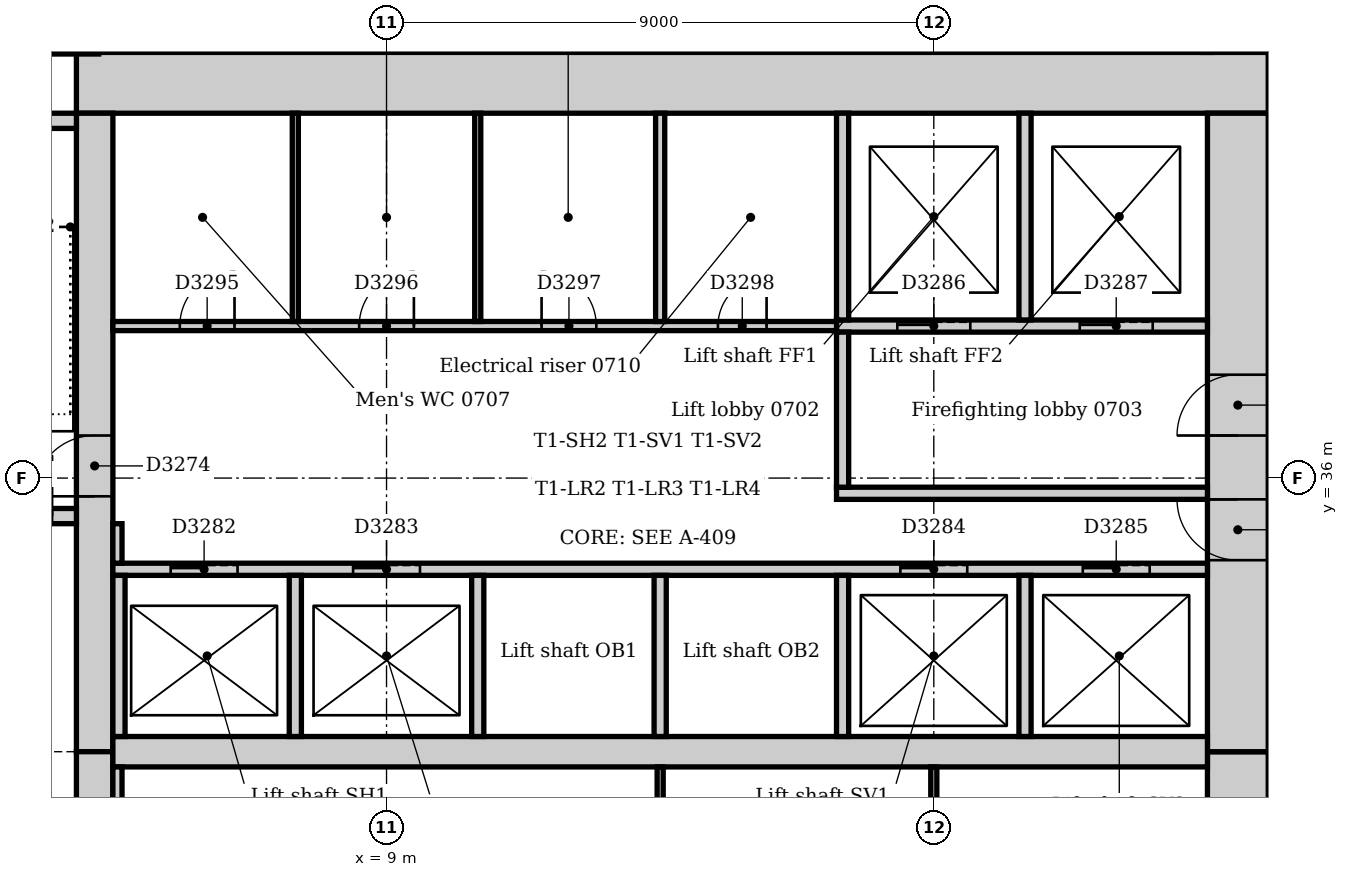
"""IFC4 building model, lengths in metres.
Left out: names, types, materials, properties, quantities, classifications, styles, units other than length and angle.
Written with IfcOpenShell. Run it as: python <this file> out.ifc"""

import sys

from ifc_helpers import new_model, si_unit, direction, frame, frame_2d, origin, origin_2d, place, context, subcontext, project, spatial, rectangle, extrude, element, fill, save


model = new_model("IFC4")
c1 = context("Model", 3, precision=1e-05, world=origin(), true_north=direction((0.0, 1.0)))
c2 = subcontext(c1, "Body", "Model", "MODEL_VIEW")
j1 = project(units=[si_unit("LENGTHUNIT", "METRE"), si_unit("PLANEANGLEUNIT", "RADIAN")], contexts=[c1])
p1 = place(None, origin())
s1 = spatial("IfcSite", under=j1, at=p1, CompositionType="ELEMENT")
p2 = place(p1, origin())
s2 = spatial("IfcBuilding", under=s1, at=p2, CompositionType="ELEMENT")
p3 = place(p2, frame((0.0, 0.0, 34.0)))
s3 = spatial("IfcBuildingStorey", under=s2, at=p3, CompositionType="ELEMENT", Elevation=34.0)
p4 = place(p3, frame((23.5, 42.5, 0.0), z_axis=(0.0, 0.0, 1.0), x_axis=(-1.0, 0.0, 0.0)))
e1 = element("IfcWall", 1, at=p4, inside=s3, PredefinedType="SOLIDWALL", context=c2, shape_type="SweptSolid", body=[
    extrude(rectangle(XDim=19.6, YDim=1.0, at=frame_2d((9.8, 0.0))), origin(), (0.0, 0.0, 1.0), 4.0),
])
p5 = place(p3, frame((23.0, 21.0, 0.0), z_axis=(0.0, 0.0, 1.0), x_axis=(0.0, 1.0, 0.0)))
e2 = element("IfcWall", 2, at=p5, inside=s3, PredefinedType="SOLIDWALL", context=c2, shape_type="SweptSolid", body=[
    extrude(rectangle(XDim=10.5, YDim=1.0, at=frame_2d((5.25, 0.0))), origin(), (0.0, 0.0, 1.0), 4.0),
])
p6 = place(p5, frame((4.35, 0.0, 0.0)))
e3 = element("IfcOpeningElement", 3, at=p6, cuts=e2, PredefinedType="OPENING", context=c2, shape_type="SweptSolid", body=[
    extrude(rectangle(XDim=1.8, YDim=2.1, at=frame_2d((0.9, 1.05))), frame((0.0, 0.51, 0.0), z_axis=(0.0, -1.0, 0.0), x_axis=(1.0, 0.0, 0.0)), (0.0, 0.0, 1.0), 1.02),
])
p7 = place(p3, frame((23.0, 31.5, 0.0), z_axis=(0.0, 0.0, 1.0), x_axis=(0.0, 1.0, 0.0)))
e4 = element("IfcWall", 4, at=p7, inside=s3, PredefinedType="SOLIDWALL", context=c2, shape_type="SweptSolid", body=[
    extrude(rectangle(XDim=10.5, YDim=1.0, at=frame_2d((5.25, 0.0))), origin(), (0.0, 0.0, 1.0), 4.0),
])
p8 = place(p7, frame((3.15, 0.0, 0.0)))
e5 = element("IfcOpeningElement", 5, at=p8, cuts=e4, PredefinedType="OPENING", context=c2, shape_type="SweptSolid", body=[
    extrude(rectangle(XDim=1.0, YDim=2.1, at=frame_2d((0.5, 1.05))), frame((0.0, 0.51, 0.0), z_axis=(0.0, -1.0, 0.0), x_axis=(1.0, 0.0, 0.0)), (0.0, 0.0, 1.0), 1.02),
])
p9 = place(p7, frame((5.2, 0.0, 0.0)))
e6 = element("IfcOpeningElement", 6, at=p9, cuts=e4, PredefinedType="OPENING", context=c2, shape_type="SweptSolid", body=[
    extrude(rectangle(XDim=1.0, YDim=2.1, at=frame_2d((0.5, 1.05))), frame((0.0, 0.51, 0.0), z_axis=(0.0, -1.0, 0.0), x_axis=(1.0, 0.0, 0.0)), (0.0, 0.0, 1.0), 1.02),
])
p10 = place(p3, frame((4.2, 42.0, 0.0), z_axis=(0.0, 0.0, 1.0), x_axis=(0.0, -1.0, 0.0)))
e7 = element("IfcWall", 7, at=p10, inside=s3, PredefinedType="SOLIDWALL", context=c2, shape_type="SweptSolid", body=[
    extrude(rectangle(XDim=10.5, YDim=0.6, at=frame_2d((5.25, 0.0))), origin(), (0.0, 0.0, 1.0), 4.0),
])
p11 = place(p10, frame((5.3, 0.0, 0.0)))
e8 = element("IfcOpeningElement", 8, at=p11, cuts=e7, PredefinedType="OPENING", context=c2, shape_type="SweptSolid", body=[
    extrude(rectangle(XDim=1.0, YDim=2.1, at=frame_2d((0.5, 1.05))), frame((0.0, 0.31, 0.0), z_axis=(0.0, -1.0, 0.0), x_axis=(1.0, 0.0, 0.0)), (0.0, 0.0, 1.0), 0.62),
])
p12 = place(p3, frame((4.2, 31.5, 0.0), z_axis=(0.0, 0.0, 1.0), x_axis=(0.0, -1.0, 0.0)))
e9 = element("IfcWall", 9, at=p12, inside=s3, PredefinedType="SOLIDWALL", context=c2, shape_type="SweptSolid", body=[
    extrude(rectangle(XDim=10.5, YDim=0.6, at=frame_2d((5.25, 0.0))), origin(), (0.0, 0.0, 1.0), 4.0),
])
p13 = place(p12, frame((4.25, 0.0, 0.0)))
e10 = element("IfcOpeningElement", 10, at=p13, cuts=e9, PredefinedType="OPENING", context=c2, shape_type="SweptSolid", body=[
    extrude(rectangle(XDim=1.0, YDim=2.1, at=frame_2d((0.5, 1.05))), frame((0.0, 0.31, 0.0), z_axis=(0.0, -1.0, 0.0), x_axis=(1.0, 0.0, 0.0)), (0.0, 0.0, 1.0), 0.62),
])
p14 = place(p3, frame((4.5, 31.5, 0.0), z_axis=(0.0, 0.0, 1.0), x_axis=(1.0, 0.0, 0.0)))
e11 = element("IfcWall", 11, at=p14, inside=s3, PredefinedType="SOLIDWALL", context=c2, shape_type="SweptSolid", body=[
    extrude(rectangle(XDim=18.0, YDim=0.5, at=frame_2d((9.0, 0.0))), origin(), (0.0, 0.0, 1.0), 4.0),
])
p15 = place(p3, frame((0.36, 35.375, 0.0), z_axis=(0.0, 0.0, 1.0), x_axis=(1.0, 0.0, 0.0)))
e12 = element("IfcWall", 12, at=p15, inside=s3, PredefinedType="SOLIDWALL", context=c2, shape_type="SweptSolid", body=[
    extrude(rectangle(XDim=3.54, YDim=0.25, at=frame_2d((1.77, 0.0))), origin(), (0.0, 0.0, 1.0), 4.0),
])
p16 = place(p15, frame((2.14, 0.0, 0.0)))
e13 = element("IfcOpeningElement", 13, at=p16, cuts=e12, PredefinedType="OPENING", context=c2, shape_type="SweptSolid", body=[
    extrude(rectangle(XDim=1.0, YDim=2.1, at=frame_2d((0.5, 1.05))), frame((0.0, 0.135, 0.0), z_axis=(0.0, -1.0, 0.0), x_axis=(1.0, 0.0, 0.0)), (0.0, 0.0, 1.0), 0.27),
])
p17 = place(p3, frame((3.9, 41.875, 0.0), z_axis=(0.0, 0.0, 1.0), x_axis=(-1.0, 0.0, 0.0)))
e14 = element("IfcWall", 14, at=p17, inside=s3, PredefinedType="SOLIDWALL", context=c2, shape_type="SweptSolid", body=[
    extrude(rectangle(XDim=3.54, YDim=0.25, at=frame_2d((1.77, 0.0))), origin(), (0.0, 0.0, 1.0), 4.0),
])
p18 = place(p3, frame((3.667, 43.574, 0.0), z_axis=(0.0, 0.0, 1.0), x_axis=(1.0, 0.0, 0.0)))
e15 = element("IfcColumn", 15, at=p18, inside=s3, PredefinedType="COLUMN", context=c2, shape_type="SweptSolid", body=[
    extrude(rectangle(XDim=1.2, YDim=1.2, at=origin_2d()), origin(), (0.0, 0.0, 1.0), 3.85),
])
p19 = place(p3, frame((16.4, 35.75, 0.0), z_axis=(0.0, 0.0, 1.0), x_axis=(1.0, 0.0, 0.0)))
e16 = element("IfcWall", 16, at=p19, inside=s3, PredefinedType="PARTITIONING", context=c2, shape_type="SweptSolid", body=[
    extrude(rectangle(XDim=6.1, YDim=0.2, at=frame_2d((3.05, 0.0))), origin(), (0.0, 0.0, 1.0), 3.85),
])
p20 = place(p3, frame((16.4, 38.5, 0.0), z_axis=(0.0, 0.0, 1.0), x_axis=(1.0, 0.0, 0.0)))
e17 = element("IfcWall", 17, at=p20, inside=s3, PredefinedType="PARTITIONING", context=c2, shape_type="SweptSolid", body=[
    extrude(rectangle(XDim=6.1, YDim=0.2, at=frame_2d((3.05, 0.0))), origin(), (0.0, 0.0, 1.0), 3.85),
])
p21 = place(p20, frame((1.0, 0.0, 0.0)))
e18 = element("IfcOpeningElement", 18, at=p21, cuts=e17, PredefinedType="OPENING", context=c2, shape_type="SweptSolid", body=[
    extrude(rectangle(XDim=1.2, YDim=2.1, at=frame_2d((0.6, 1.05))), frame((0.0, 0.11, 0.0), z_axis=(0.0, -1.0, 0.0), x_axis=(1.0, 0.0, 0.0)), (0.0, 0.0, 1.0), 0.22),
])
p22 = place(p20, frame((4.0, 0.0, 0.0)))
e19 = element("IfcOpeningElement", 19, at=p22, cuts=e17, PredefinedType="OPENING", context=c2, shape_type="SweptSolid", body=[
    extrude(rectangle(XDim=1.2, YDim=2.1, at=frame_2d((0.6, 1.05))), frame((0.0, 0.11, 0.0), z_axis=(0.0, -1.0, 0.0), x_axis=(1.0, 0.0, 0.0)), (0.0, 0.0, 1.0), 0.22),
])
p23 = place(p3, frame((16.5, 35.85, 0.0), z_axis=(0.0, 0.0, 1.0), x_axis=(0.0, 1.0, 0.0)))
e20 = element("IfcWall", 20, at=p23, inside=s3, PredefinedType="PARTITIONING", context=c2, shape_type="SweptSolid", body=[
    extrude(rectangle(XDim=2.55, YDim=0.2, at=frame_2d((1.275, 0.0))), origin(), (0.0, 0.0, 1.0), 3.85),
])
p24 = place(p3, frame((4.5, 34.5, 0.0), z_axis=(0.0, 0.0, 1.0), x_axis=(1.0, 0.0, 0.0)))
e21 = element("IfcWall", 21, at=p24, inside=s3, PredefinedType="PARTITIONING", context=c2, shape_type="SweptSolid", body=[
    extrude(rectangle(XDim=18.0, YDim=0.2, at=frame_2d((9.0, 0.0))), origin(), (0.0, 0.0, 1.0), 3.85),
])
p25 = place(p24, frame((0.95, 0.0, 0.0)))
e22 = element("IfcOpeningElement", 22, at=p25, cuts=e21, PredefinedType="OPENING", context=c2, shape_type="SweptSolid", body=[
    extrude(rectangle(XDim=1.1, YDim=2.1, at=frame_2d((0.55, 1.05))), frame((0.0, 0.11, 0.0), z_axis=(0.0, -1.0, 0.0), x_axis=(1.0, 0.0, 0.0)), (0.0, 0.0, 1.0), 0.22),
])
p26 = place(p24, frame((3.95, 0.0, 0.0)))
e23 = element("IfcOpeningElement", 23, at=p26, cuts=e21, PredefinedType="OPENING", context=c2, shape_type="SweptSolid", body=[
    extrude(rectangle(XDim=1.1, YDim=2.1, at=frame_2d((0.55, 1.05))), frame((0.0, 0.11, 0.0), z_axis=(0.0, -1.0, 0.0), x_axis=(1.0, 0.0, 0.0)), (0.0, 0.0, 1.0), 0.22),
])
p27 = place(p24, frame((12.95, 0.0, 0.0)))
e24 = element("IfcOpeningElement", 24, at=p27, cuts=e21, PredefinedType="OPENING", context=c2, shape_type="SweptSolid", body=[
    extrude(rectangle(XDim=1.1, YDim=2.1, at=frame_2d((0.55, 1.05))), frame((0.0, 0.11, 0.0), z_axis=(0.0, -1.0, 0.0), x_axis=(1.0, 0.0, 0.0)), (0.0, 0.0, 1.0), 0.22),
])
p28 = place(p24, frame((15.95, 0.0, 0.0)))
e25 = element("IfcOpeningElement", 25, at=p28, cuts=e21, PredefinedType="OPENING", context=c2, shape_type="SweptSolid", body=[
    extrude(rectangle(XDim=1.1, YDim=2.1, at=frame_2d((0.55, 1.05))), frame((0.0, 0.11, 0.0), z_axis=(0.0, -1.0, 0.0), x_axis=(1.0, 0.0, 0.0)), (0.0, 0.0, 1.0), 0.22),
])
for number, where, z_axis, x_axis in (
    (26, (16.5, 38.6, 0.0), (0.0, 0.0, 1.0), (0.0, 1.0, 0.0)),
    (27, (19.5, 38.6, 0.0), (0.0, 0.0, 1.0), (0.0, 1.0, 0.0)),
):
    element("IfcWall", number, at=place(p3, frame(where, z_axis=z_axis, x_axis=x_axis)), inside=s3, PredefinedType="PARTITIONING", context=c2, shape_type="SweptSolid", body=[
        extrude(rectangle(XDim=3.4, YDim=0.2, at=frame_2d((1.7, 0.0))), origin(), (0.0, 0.0, 1.0), 3.85),
    ])
for number, where, z_axis, x_axis in (
    (28, (4.6, 31.75, 0.0), (0.0, 0.0, 1.0), (0.0, 1.0, 0.0)),
    (29, (7.5, 31.75, 0.0), (0.0, 0.0, 1.0), (0.0, 1.0, 0.0)),
    (30, (10.5, 31.75, 0.0), (0.0, 0.0, 1.0), (0.0, 1.0, 0.0)),
    (31, (13.5, 31.75, 0.0), (0.0, 0.0, 1.0), (0.0, 1.0, 0.0)),
    (32, (16.5, 31.75, 0.0), (0.0, 0.0, 1.0), (0.0, 1.0, 0.0)),
    (33, (19.5, 31.75, 0.0), (0.0, 0.0, 1.0), (0.0, 1.0, 0.0)),
):
    element("IfcWall", number, at=place(p3, frame(where, z_axis=z_axis, x_axis=x_axis)), inside=s3, PredefinedType="PARTITIONING", context=c2, shape_type="SweptSolid", body=[
        extrude(rectangle(XDim=2.65, YDim=0.2, at=frame_2d((1.325, 0.0))), origin(), (0.0, 0.0, 1.0), 3.85),
    ])
p29 = place(p3, frame((4.5, 38.5, 0.0), z_axis=(0.0, 0.0, 1.0), x_axis=(1.0, 0.0, 0.0)))
e34 = element("IfcWall", 34, at=p29, inside=s3, PredefinedType="PARTITIONING", context=c2, shape_type="SweptSolid", body=[
    extrude(rectangle(XDim=11.9, YDim=0.15, at=frame_2d((5.95, 0.0))), origin(), (0.0, 0.0, 1.0), 3.85),
])
p30 = place(p29, frame((1.1, 0.0, 0.0)))
e35 = element("IfcOpeningElement", 35, at=p30, cuts=e34, PredefinedType="OPENING", context=c2, shape_type="SweptSolid", body=[
    extrude(rectangle(XDim=0.9, YDim=2.1, at=frame_2d((0.45, 1.05))), frame((0.0, 0.085, 0.0), z_axis=(0.0, -1.0, 0.0), x_axis=(1.0, 0.0, 0.0)), (0.0, 0.0, 1.0), 0.17),
])
p31 = place(p29, frame((4.05, 0.0, 0.0)))
e36 = element("IfcOpeningElement", 36, at=p31, cuts=e34, PredefinedType="OPENING", context=c2, shape_type="SweptSolid", body=[
    extrude(rectangle(XDim=0.9, YDim=2.1, at=frame_2d((0.45, 1.05))), frame((0.0, 0.085, 0.0), z_axis=(0.0, -1.0, 0.0), x_axis=(1.0, 0.0, 0.0)), (0.0, 0.0, 1.0), 0.17),
])
p32 = place(p29, frame((7.05, 0.0, 0.0)))
e37 = element("IfcOpeningElement", 37, at=p32, cuts=e34, PredefinedType="OPENING", context=c2, shape_type="SweptSolid", body=[
    extrude(rectangle(XDim=0.9, YDim=2.1, at=frame_2d((0.45, 1.05))), frame((0.0, 0.085, 0.0), z_axis=(0.0, -1.0, 0.0), x_axis=(1.0, 0.0, 0.0)), (0.0, 0.0, 1.0), 0.17),
])
p33 = place(p29, frame((9.95, 0.0, 0.0)))
e38 = element("IfcOpeningElement", 38, at=p33, cuts=e34, PredefinedType="OPENING", context=c2, shape_type="SweptSolid", body=[
    extrude(rectangle(XDim=0.8, YDim=2.1, at=frame_2d((0.4, 1.05))), frame((0.0, 0.085, 0.0), z_axis=(0.0, -1.0, 0.0), x_axis=(1.0, 0.0, 0.0)), (0.0, 0.0, 1.0), 0.17),
])
p34 = place(p3, frame((4.575, 28.575, 0.0), z_axis=(0.0, 0.0, 1.0), x_axis=(0.0, 1.0, 0.0)))
e39 = element("IfcWall", 39, at=p34, inside=s3, PredefinedType="PARTITIONING", context=c2, shape_type="SweptSolid", body=[
    extrude(rectangle(XDim=2.675, YDim=0.15, at=frame_2d((1.337, 0.0))), origin(), (0.0, 0.0, 1.0), 3.85),
])
p35 = place(p3, frame((4.575, 34.6, 0.0), z_axis=(0.0, 0.0, 1.0), x_axis=(0.0, 1.0, 0.0)))
e40 = element("IfcWall", 40, at=p35, inside=s3, PredefinedType="PARTITIONING", context=c2, shape_type="SweptSolid", body=[
    extrude(rectangle(XDim=0.65, YDim=0.15, at=frame_2d((0.325, 0.0))), origin(), (0.0, 0.0, 1.0), 3.85),
])
p36 = place(p3, frame((13.5, 38.575, 0.0), z_axis=(0.0, 0.0, 1.0), x_axis=(0.0, 1.0, 0.0)))
e41 = element("IfcWall", 41, at=p36, inside=s3, PredefinedType="PARTITIONING", context=c2, shape_type="SweptSolid", body=[
    extrude(rectangle(XDim=3.425, YDim=0.15, at=frame_2d((1.712, 0.0))), origin(), (0.0, 0.0, 1.0), 3.85),
])
for number, where, z_axis, x_axis in (
    (42, (7.5, 38.575, 0.0), (0.0, 0.0, 1.0), (0.0, 1.0, 0.0)),
    (43, (10.5, 38.575, 0.0), (0.0, 0.0, 1.0), (0.0, 1.0, 0.0)),
):
    element("IfcWall", number, at=place(p3, frame(where, z_axis=z_axis, x_axis=x_axis)), inside=s3, PredefinedType="PARTITIONING", context=c2, shape_type="SweptSolid", body=[
        extrude(rectangle(XDim=3.425, YDim=0.1, at=frame_2d((1.712, 0.0))), origin(), (0.0, 0.0, 1.0), 3.85),
    ])
for number, where, z_axis, x_axis in (
    (44, (13.5, 28.575, 0.0), (0.0, 0.0, 1.0), (0.0, 1.0, 0.0)),
    (45, (18.0, 28.575, 0.0), (0.0, 0.0, 1.0), (0.0, 1.0, 0.0)),
):
    element("IfcWall", number, at=place(p3, frame(where, z_axis=z_axis, x_axis=x_axis)), inside=s3, PredefinedType="PARTITIONING", context=c2, shape_type="SweptSolid", body=[
        extrude(rectangle(XDim=2.675, YDim=0.1, at=frame_2d((1.337, 0.0))), origin(), (0.0, 0.0, 1.0), 3.85),
    ])
p37 = place(p11, frame((1.0, 0.0, 0.0), z_axis=(0.0, 0.0, 1.0), x_axis=(-1.0, 0.0, 0.0)))
e46 = element("IfcDoor", 46, at=p37, inside=s3, OperationType="SINGLE_SWING_LEFT", PredefinedType="DOOR", context=c2, shape_type="SweptSolid", body=[
    extrude(rectangle(XDim=1.0, YDim=2.1, at=frame_2d((0.5, 1.05))), frame((0.0, 0.025, 0.0), z_axis=(0.0, -1.0, 0.0), x_axis=(1.0, 0.0, 0.0)), (0.0, 0.0, 1.0), 0.05),
])
fill(e8, e46)
p38 = place(p25, origin())
e47 = element("IfcDoor", 47, at=p38, inside=s3, OperationType="SLIDING_TO_LEFT", PredefinedType="DOOR", context=c2, shape_type="SweptSolid", body=[
    extrude(rectangle(XDim=1.1, YDim=2.1, at=frame_2d((0.55, 1.05))), frame((0.0, 0.025, 0.0), z_axis=(0.0, -1.0, 0.0), x_axis=(1.0, 0.0, 0.0)), (0.0, 0.0, 1.0), 0.05),
])
fill(e22, e47)
p39 = place(p26, origin())
e48 = element("IfcDoor", 48, at=p39, inside=s3, OperationType="SLIDING_TO_LEFT", PredefinedType="DOOR", context=c2, shape_type="SweptSolid", body=[
    extrude(rectangle(XDim=1.1, YDim=2.1, at=frame_2d((0.55, 1.05))), frame((0.0, 0.025, 0.0), z_axis=(0.0, -1.0, 0.0), x_axis=(1.0, 0.0, 0.0)), (0.0, 0.0, 1.0), 0.05),
])
fill(e23, e48)
p40 = place(p27, origin())
e49 = element("IfcDoor", 49, at=p40, inside=s3, OperationType="SLIDING_TO_LEFT", PredefinedType="DOOR", context=c2, shape_type="SweptSolid", body=[
    extrude(rectangle(XDim=1.1, YDim=2.1, at=frame_2d((0.55, 1.05))), frame((0.0, 0.025, 0.0), z_axis=(0.0, -1.0, 0.0), x_axis=(1.0, 0.0, 0.0)), (0.0, 0.0, 1.0), 0.05),
])
fill(e24, e49)
p41 = place(p28, origin())
e50 = element("IfcDoor", 50, at=p41, inside=s3, OperationType="SLIDING_TO_LEFT", PredefinedType="DOOR", context=c2, shape_type="SweptSolid", body=[
    extrude(rectangle(XDim=1.1, YDim=2.1, at=frame_2d((0.55, 1.05))), frame((0.0, 0.025, 0.0), z_axis=(0.0, -1.0, 0.0), x_axis=(1.0, 0.0, 0.0)), (0.0, 0.0, 1.0), 0.05),
])
fill(e25, e50)
p42 = place(p21, origin())
e51 = element("IfcDoor", 51, at=p42, inside=s3, OperationType="SLIDING_TO_LEFT", PredefinedType="DOOR", context=c2, shape_type="SweptSolid", body=[
    extrude(rectangle(XDim=1.2, YDim=2.1, at=frame_2d((0.6, 1.05))), frame((0.0, 0.025, 0.0), z_axis=(0.0, -1.0, 0.0), x_axis=(1.0, 0.0, 0.0)), (0.0, 0.0, 1.0), 0.05),
])
fill(e18, e51)
p43 = place(p22, origin())
e52 = element("IfcDoor", 52, at=p43, inside=s3, OperationType="SLIDING_TO_LEFT", PredefinedType="DOOR", context=c2, shape_type="SweptSolid", body=[
    extrude(rectangle(XDim=1.2, YDim=2.1, at=frame_2d((0.6, 1.05))), frame((0.0, 0.025, 0.0), z_axis=(0.0, -1.0, 0.0), x_axis=(1.0, 0.0, 0.0)), (0.0, 0.0, 1.0), 0.05),
])
fill(e19, e52)
p44 = place(p8, origin())
e53 = element("IfcDoor", 53, at=p44, inside=s3, OperationType="SINGLE_SWING_RIGHT", PredefinedType="DOOR", context=c2, shape_type="SweptSolid", body=[
    extrude(rectangle(XDim=1.0, YDim=2.1, at=frame_2d((0.5, 1.05))), frame((0.0, 0.025, 0.0), z_axis=(0.0, -1.0, 0.0), x_axis=(1.0, 0.0, 0.0)), (0.0, 0.0, 1.0), 0.05),
])
fill(e5, e53)
p45 = place(p9, origin())
e54 = element("IfcDoor", 54, at=p45, inside=s3, OperationType="SINGLE_SWING_LEFT", PredefinedType="DOOR", context=c2, shape_type="SweptSolid", body=[
    extrude(rectangle(XDim=1.0, YDim=2.1, at=frame_2d((0.5, 1.05))), frame((0.0, 0.025, 0.0), z_axis=(0.0, -1.0, 0.0), x_axis=(1.0, 0.0, 0.0)), (0.0, 0.0, 1.0), 0.05),
])
fill(e6, e54)
p46 = place(p30, origin())
e55 = element("IfcDoor", 55, at=p46, inside=s3, OperationType="SINGLE_SWING_RIGHT", PredefinedType="DOOR", context=c2, shape_type="SweptSolid", body=[
    extrude(rectangle(XDim=0.9, YDim=2.1, at=frame_2d((0.45, 1.05))), frame((0.0, 0.025, 0.0), z_axis=(0.0, -1.0, 0.0), x_axis=(1.0, 0.0, 0.0)), (0.0, 0.0, 1.0), 0.05),
])
fill(e35, e55)
p47 = place(p31, origin())
e56 = element("IfcDoor", 56, at=p47, inside=s3, OperationType="SINGLE_SWING_RIGHT", PredefinedType="DOOR", context=c2, shape_type="SweptSolid", body=[
    extrude(rectangle(XDim=0.9, YDim=2.1, at=frame_2d((0.45, 1.05))), frame((0.0, 0.025, 0.0), z_axis=(0.0, -1.0, 0.0), x_axis=(1.0, 0.0, 0.0)), (0.0, 0.0, 1.0), 0.05),
])
fill(e36, e56)
p48 = place(p32, origin())
e57 = element("IfcDoor", 57, at=p48, inside=s3, OperationType="SINGLE_SWING_LEFT", PredefinedType="DOOR", context=c2, shape_type="SweptSolid", body=[
    extrude(rectangle(XDim=0.9, YDim=2.1, at=frame_2d((0.45, 1.05))), frame((0.0, 0.025, 0.0), z_axis=(0.0, -1.0, 0.0), x_axis=(1.0, 0.0, 0.0)), (0.0, 0.0, 1.0), 0.05),
])
fill(e37, e57)
p49 = place(p33, origin())
e58 = element("IfcDoor", 58, at=p49, inside=s3, OperationType="SINGLE_SWING_RIGHT", PredefinedType="DOOR", context=c2, shape_type="SweptSolid", body=[
    extrude(rectangle(XDim=0.8, YDim=2.1, at=frame_2d((0.4, 1.05))), frame((0.0, 0.025, 0.0), z_axis=(0.0, -1.0, 0.0), x_axis=(1.0, 0.0, 0.0)), (0.0, 0.0, 1.0), 0.05),
])
fill(e38, e58)
save(model, sys.argv[1])
